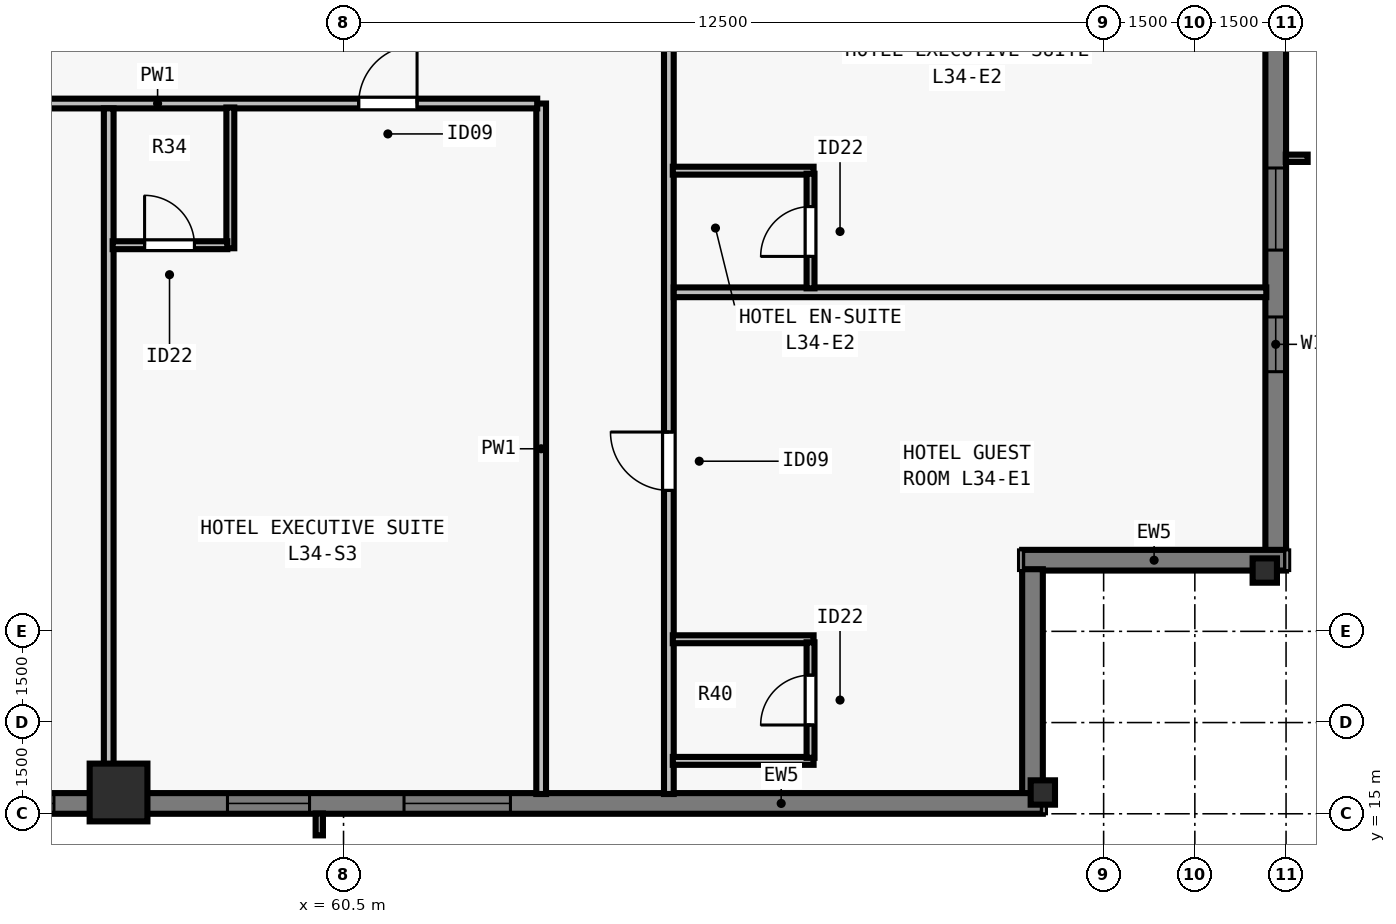
"""IFC4 building model, lengths in metres.
Left out: names, types, materials, properties, quantities, classifications, styles, units other than length and angle.
Written with IfcOpenShell. Run it as: python <this file> out.ifc"""

import sys

from ifc_helpers import new_model, si_unit, direction, frame, frame_2d, origin, origin_2d, place, context, subcontext, project, spatial, rectangle, i_section, extrude, element, fill, save


model = new_model("IFC4")
c1 = context("Model", 3, precision=1e-05, world=origin(), true_north=direction((0.0, 1.0)))
c2 = subcontext(c1, "Body", "Model", "MODEL_VIEW")
j1 = project(units=[si_unit("LENGTHUNIT", "METRE"), si_unit("PLANEANGLEUNIT", "RADIAN")], contexts=[c1])
p1 = place(None, origin())
s1 = spatial("IfcSite", under=j1, at=p1, CompositionType="ELEMENT")
p2 = place(p1, origin())
s2 = spatial("IfcBuilding", under=s1, at=p2, CompositionType="ELEMENT")
p3 = place(p2, frame((0.0, 0.0, 127.0)))
s3 = spatial("IfcBuildingStorey", under=s2, at=p3, CompositionType="ELEMENT", Elevation=127.0)
p4 = place(p3, frame((56.8, 15.35, 0.0), z_axis=(0.0, 0.0, 1.0), x_axis=(1.0, 0.0, 0.0)))
e1 = element("IfcColumn", 1, at=p4, inside=s3, PredefinedType="COLUMN", context=c2, shape_type="SweptSolid", body=[
    extrude(rectangle(XDim=0.95, YDim=0.95, at=origin_2d()), origin(), (0.0, 0.0, 1.0), 3.5),
])
for number, where, z_axis, x_axis in (
    (2, (72.0, 15.35, 0.0), (0.0, 0.0, 1.0), (1.0, 0.0, 0.0)),
    (3, (75.65, 19.0, 0.0), (0.0, 0.0, 1.0), (0.0, 1.0, 0.0)),
):
    element("IfcColumn", number, at=place(p3, frame(where, z_axis=z_axis, x_axis=x_axis)), inside=s3, PredefinedType="COLUMN", context=c2, shape_type="SweptSolid", body=[
        extrude(i_section(OverallWidth=0.4, OverallDepth=0.4, WebThickness=0.022, FlangeThickness=0.036, at=origin_2d()), origin(), (0.0, 0.0, 1.0), 3.5),
    ])
p5 = place(p3, frame((75.83, 59.0, 0.0), z_axis=(0.0, 0.0, 1.0), x_axis=(0.0, -1.0, 0.0)))
e4 = element("IfcWall", 4, at=p5, inside=s3, PredefinedType="SOLIDWALL", context=c2, shape_type="SweptSolid", body=[
    extrude(rectangle(XDim=39.682, YDim=0.34, at=frame_2d((19.841, 0.0))), origin(), (0.0, 0.0, 1.0), 3.28),
])
p6 = place(p5, frame((4.952, 0.0, 0.8)))
e5 = element("IfcOpeningElement", 5, at=p6, cuts=e4, PredefinedType="OPENING", context=c2, shape_type="SweptSolid", body=[
    extrude(rectangle(XDim=1.35, YDim=1.66, at=frame_2d((0.675, 0.83))), frame((0.0, 0.18, 0.0), z_axis=(0.0, -1.0, 0.0), x_axis=(1.0, 0.0, 0.0)), (0.0, 0.0, 1.0), 0.36),
])
p7 = place(p5, frame((8.305, 0.0, 0.8)))
e6 = element("IfcOpeningElement", 6, at=p7, cuts=e4, PredefinedType="OPENING", context=c2, shape_type="SweptSolid", body=[
    extrude(rectangle(XDim=1.75, YDim=1.66, at=frame_2d((0.875, 0.83))), frame((0.0, 0.18, 0.0), z_axis=(0.0, -1.0, 0.0), x_axis=(1.0, 0.0, 0.0)), (0.0, 0.0, 1.0), 0.36),
])
p8 = place(p5, frame((12.909, 0.0, 0.8)))
e7 = element("IfcOpeningElement", 7, at=p8, cuts=e4, PredefinedType="OPENING", context=c2, shape_type="SweptSolid", body=[
    extrude(rectangle(XDim=1.35, YDim=1.66, at=frame_2d((0.675, 0.83))), frame((0.0, 0.18, 0.0), z_axis=(0.0, -1.0, 0.0), x_axis=(1.0, 0.0, 0.0)), (0.0, 0.0, 1.0), 0.36),
])
p9 = place(p5, frame((16.262, 0.0, 0.8)))
e8 = element("IfcOpeningElement", 8, at=p9, cuts=e4, PredefinedType="OPENING", context=c2, shape_type="SweptSolid", body=[
    extrude(rectangle(XDim=1.75, YDim=1.66, at=frame_2d((0.875, 0.83))), frame((0.0, 0.18, 0.0), z_axis=(0.0, -1.0, 0.0), x_axis=(1.0, 0.0, 0.0)), (0.0, 0.0, 1.0), 0.36),
])
p10 = place(p5, frame((20.016, 0.0, 0.8)))
e9 = element("IfcOpeningElement", 9, at=p10, cuts=e4, PredefinedType="OPENING", context=c2, shape_type="SweptSolid", body=[
    extrude(rectangle(XDim=1.35, YDim=1.66, at=frame_2d((0.675, 0.83))), frame((0.0, 0.18, 0.0), z_axis=(0.0, -1.0, 0.0), x_axis=(1.0, 0.0, 0.0)), (0.0, 0.0, 1.0), 0.36),
])
p11 = place(p5, frame((22.07, 0.0, 0.8)))
e10 = element("IfcOpeningElement", 10, at=p11, cuts=e4, PredefinedType="OPENING", context=c2, shape_type="SweptSolid", body=[
    extrude(rectangle(XDim=1.75, YDim=1.66, at=frame_2d((0.875, 0.83))), frame((0.0, 0.18, 0.0), z_axis=(0.0, -1.0, 0.0), x_axis=(1.0, 0.0, 0.0)), (0.0, 0.0, 1.0), 0.36),
])
p12 = place(p5, frame((26.273, 0.0, 0.8)))
e11 = element("IfcOpeningElement", 11, at=p12, cuts=e4, PredefinedType="OPENING", context=c2, shape_type="SweptSolid", body=[
    extrude(rectangle(XDim=1.35, YDim=1.66, at=frame_2d((0.675, 0.83))), frame((0.0, 0.18, 0.0), z_axis=(0.0, -1.0, 0.0), x_axis=(1.0, 0.0, 0.0)), (0.0, 0.0, 1.0), 0.36),
])
p13 = place(p5, frame((29.627, 0.0, 0.8)))
e12 = element("IfcOpeningElement", 12, at=p13, cuts=e4, PredefinedType="OPENING", context=c2, shape_type="SweptSolid", body=[
    extrude(rectangle(XDim=1.75, YDim=1.66, at=frame_2d((0.875, 0.83))), frame((0.0, 0.18, 0.0), z_axis=(0.0, -1.0, 0.0), x_axis=(1.0, 0.0, 0.0)), (0.0, 0.0, 1.0), 0.36),
])
p14 = place(p5, frame((33.38, 0.0, 0.8)))
e13 = element("IfcOpeningElement", 13, at=p14, cuts=e4, PredefinedType="OPENING", context=c2, shape_type="SweptSolid", body=[
    extrude(rectangle(XDim=1.35, YDim=1.66, at=frame_2d((0.675, 0.83))), frame((0.0, 0.18, 0.0), z_axis=(0.0, -1.0, 0.0), x_axis=(1.0, 0.0, 0.0)), (0.0, 0.0, 1.0), 0.36),
])
p15 = place(p5, frame((35.83, 0.0, 0.8)))
e14 = element("IfcOpeningElement", 14, at=p15, cuts=e4, PredefinedType="OPENING", context=c2, shape_type="SweptSolid", body=[
    extrude(rectangle(XDim=0.9, YDim=1.66, at=frame_2d((0.45, 0.83))), frame((0.0, 0.18, 0.0), z_axis=(0.0, -1.0, 0.0), x_axis=(1.0, 0.0, 0.0)), (0.0, 0.0, 1.0), 0.36),
])
p16 = place(p3, frame((76.0, 19.17, 0.0), z_axis=(0.0, 0.0, 1.0), x_axis=(-1.0, 0.0, 0.0)))
e15 = element("IfcWall", 15, at=p16, inside=s3, PredefinedType="SOLIDWALL", context=c2, shape_type="SweptSolid", body=[
    extrude(rectangle(XDim=4.34, YDim=0.34, at=frame_2d((2.17, 0.0))), origin(), (0.0, 0.0, 1.0), 3.28),
])
p17 = place(p3, frame((71.83, 19.022, 0.0), z_axis=(0.0, 0.0, 1.0), x_axis=(0.0, -1.0, 0.0)))
e16 = element("IfcWall", 16, at=p17, inside=s3, PredefinedType="SOLIDWALL", context=c2, shape_type="SweptSolid", body=[
    extrude(rectangle(XDim=3.704, YDim=0.34, at=frame_2d((1.852, 0.0))), origin(), (0.0, 0.0, 1.0), 3.28),
])
p18 = place(p3, frame((72.0, 15.17, 0.0), z_axis=(0.0, 0.0, 1.0), x_axis=(-1.0, 0.0, 0.0)))
e17 = element("IfcWall", 17, at=p18, inside=s3, PredefinedType="SOLIDWALL", context=c2, shape_type="SweptSolid", body=[
    extrude(rectangle(XDim=39.682, YDim=0.34, at=frame_2d((19.841, 0.0))), origin(), (0.0, 0.0, 1.0), 3.28),
])
p19 = place(p18, frame((8.755, 0.0, 0.8)))
e18 = element("IfcOpeningElement", 18, at=p19, cuts=e17, PredefinedType="OPENING", context=c2, shape_type="SweptSolid", body=[
    extrude(rectangle(XDim=1.75, YDim=1.66, at=frame_2d((0.875, 0.83))), frame((0.0, 0.18, 0.0), z_axis=(0.0, -1.0, 0.0), x_axis=(1.0, 0.0, 0.0)), (0.0, 0.0, 1.0), 0.36),
])
p20 = place(p18, frame((12.059, 0.0, 0.8)))
e19 = element("IfcOpeningElement", 19, at=p20, cuts=e17, PredefinedType="OPENING", context=c2, shape_type="SweptSolid", body=[
    extrude(rectangle(XDim=1.35, YDim=1.66, at=frame_2d((0.675, 0.83))), frame((0.0, 0.18, 0.0), z_axis=(0.0, -1.0, 0.0), x_axis=(1.0, 0.0, 0.0)), (0.0, 0.0, 1.0), 0.36),
])
p21 = place(p18, frame((16.262, 0.0, 0.8)))
e20 = element("IfcOpeningElement", 20, at=p21, cuts=e17, PredefinedType="OPENING", context=c2, shape_type="SweptSolid", body=[
    extrude(rectangle(XDim=1.75, YDim=1.66, at=frame_2d((0.875, 0.83))), frame((0.0, 0.18, 0.0), z_axis=(0.0, -1.0, 0.0), x_axis=(1.0, 0.0, 0.0)), (0.0, 0.0, 1.0), 0.36),
])
p22 = place(p18, frame((19.166, 0.0, 0.8)))
e21 = element("IfcOpeningElement", 21, at=p22, cuts=e17, PredefinedType="OPENING", context=c2, shape_type="SweptSolid", body=[
    extrude(rectangle(XDim=1.35, YDim=1.66, at=frame_2d((0.675, 0.83))), frame((0.0, 0.18, 0.0), z_axis=(0.0, -1.0, 0.0), x_axis=(1.0, 0.0, 0.0)), (0.0, 0.0, 1.0), 0.36),
])
p23 = place(p18, frame((21.27, 0.0, 0.8)))
e22 = element("IfcOpeningElement", 22, at=p23, cuts=e17, PredefinedType="OPENING", context=c2, shape_type="SweptSolid", body=[
    extrude(rectangle(XDim=1.75, YDim=1.66, at=frame_2d((0.875, 0.83))), frame((0.0, 0.18, 0.0), z_axis=(0.0, -1.0, 0.0), x_axis=(1.0, 0.0, 0.0)), (0.0, 0.0, 1.0), 0.36),
])
p24 = place(p18, frame((26.273, 0.0, 0.8)))
e23 = element("IfcOpeningElement", 23, at=p24, cuts=e17, PredefinedType="OPENING", context=c2, shape_type="SweptSolid", body=[
    extrude(rectangle(XDim=1.35, YDim=1.66, at=frame_2d((0.675, 0.83))), frame((0.0, 0.18, 0.0), z_axis=(0.0, -1.0, 0.0), x_axis=(1.0, 0.0, 0.0)), (0.0, 0.0, 1.0), 0.36),
])
p25 = place(p18, frame((28.377, 0.0, 0.8)))
e24 = element("IfcOpeningElement", 24, at=p25, cuts=e17, PredefinedType="OPENING", context=c2, shape_type="SweptSolid", body=[
    extrude(rectangle(XDim=1.75, YDim=1.66, at=frame_2d((0.875, 0.83))), frame((0.0, 0.18, 0.0), z_axis=(0.0, -1.0, 0.0), x_axis=(1.0, 0.0, 0.0)), (0.0, 0.0, 1.0), 0.36),
])
p26 = place(p18, frame((32.93, 0.0, 0.8)))
e25 = element("IfcOpeningElement", 25, at=p26, cuts=e17, PredefinedType="OPENING", context=c2, shape_type="SweptSolid", body=[
    extrude(rectangle(XDim=1.35, YDim=1.66, at=frame_2d((0.675, 0.83))), frame((0.0, 0.18, 0.0), z_axis=(0.0, -1.0, 0.0), x_axis=(1.0, 0.0, 0.0)), (0.0, 0.0, 1.0), 0.36),
])
p27 = place(p3, frame((65.85, 15.325, 0.0), z_axis=(0.0, 0.0, 1.0), x_axis=(0.0, 1.0, 0.0)))
e26 = element("IfcWall", 26, at=p27, inside=s3, PredefinedType="PARTITIONING", context=c2, shape_type="SweptSolid", body=[
    extrude(rectangle(XDim=47.35, YDim=0.16, at=frame_2d((23.675, 0.0))), origin(), (0.0, 0.0, 1.0), 2.555),
])
p28 = place(p27, frame((4.993, 0.0, 0.0)))
e27 = element("IfcOpeningElement", 27, at=p28, cuts=e26, PredefinedType="OPENING", context=c2, shape_type="SweptSolid", body=[
    extrude(rectangle(XDim=0.96, YDim=2.15, at=frame_2d((0.48, 1.075))), frame((0.0, 0.09, 0.0), z_axis=(0.0, -1.0, 0.0), x_axis=(1.0, 0.0, 0.0)), (0.0, 0.0, 1.0), 0.18),
])
p29 = place(p27, frame((12.525, 0.0, 0.0)))
e28 = element("IfcOpeningElement", 28, at=p29, cuts=e26, PredefinedType="OPENING", context=c2, shape_type="SweptSolid", body=[
    extrude(rectangle(XDim=0.96, YDim=2.15, at=frame_2d((0.48, 1.075))), frame((0.0, 0.09, 0.0), z_axis=(0.0, -1.0, 0.0), x_axis=(1.0, 0.0, 0.0)), (0.0, 0.0, 1.0), 0.18),
])
p30 = place(p27, frame((20.385, 0.0, 0.0)))
e29 = element("IfcOpeningElement", 29, at=p30, cuts=e26, PredefinedType="OPENING", context=c2, shape_type="SweptSolid", body=[
    extrude(rectangle(XDim=0.96, YDim=2.15, at=frame_2d((0.48, 1.075))), frame((0.0, 0.09, 0.0), z_axis=(0.0, -1.0, 0.0), x_axis=(1.0, 0.0, 0.0)), (0.0, 0.0, 1.0), 0.18),
])
p31 = place(p27, frame((28.246, 0.0, 0.0)))
e30 = element("IfcOpeningElement", 30, at=p31, cuts=e26, PredefinedType="OPENING", context=c2, shape_type="SweptSolid", body=[
    extrude(rectangle(XDim=0.96, YDim=2.15, at=frame_2d((0.48, 1.075))), frame((0.0, 0.09, 0.0), z_axis=(0.0, -1.0, 0.0), x_axis=(1.0, 0.0, 0.0)), (0.0, 0.0, 1.0), 0.18),
])
p32 = place(p27, frame((36.105, 0.0, 0.0)))
e31 = element("IfcOpeningElement", 31, at=p32, cuts=e26, PredefinedType="OPENING", context=c2, shape_type="SweptSolid", body=[
    extrude(rectangle(XDim=0.96, YDim=2.15, at=frame_2d((0.48, 1.075))), frame((0.0, 0.09, 0.0), z_axis=(0.0, -1.0, 0.0), x_axis=(1.0, 0.0, 0.0)), (0.0, 0.0, 1.0), 0.18),
])
p33 = place(p27, frame((44.068, 0.0, 0.0)))
e32 = element("IfcOpeningElement", 32, at=p33, cuts=e26, PredefinedType="OPENING", context=c2, shape_type="SweptSolid", body=[
    extrude(rectangle(XDim=0.96, YDim=2.15, at=frame_2d((0.48, 1.075))), frame((0.0, 0.09, 0.0), z_axis=(0.0, -1.0, 0.0), x_axis=(1.0, 0.0, 0.0)), (0.0, 0.0, 1.0), 0.18),
])
p34 = place(p3, frame((63.75, 15.325, 0.0), z_axis=(0.0, 0.0, 1.0), x_axis=(0.0, 1.0, 0.0)))
e33 = element("IfcWall", 33, at=p34, inside=s3, PredefinedType="PARTITIONING", context=c2, shape_type="SweptSolid", body=[
    extrude(rectangle(XDim=11.355, YDim=0.16, at=frame_2d((5.677, 0.0))), origin(), (0.0, 0.0, 1.0), 2.555),
])
p35 = place(p3, frame((41.615, 26.68, 0.0), z_axis=(0.0, 0.0, 1.0), x_axis=(1.0, 0.0, 0.0)))
e34 = element("IfcWall", 34, at=p35, inside=s3, PredefinedType="PARTITIONING", context=c2, shape_type="SweptSolid", body=[
    extrude(rectangle(XDim=22.07, YDim=0.16, at=frame_2d((11.035, 0.0))), origin(), (0.0, 0.0, 1.0), 3.28),
])
p36 = place(p35, frame((4.281, 0.0, 0.0)))
e35 = element("IfcOpeningElement", 35, at=p36, cuts=e34, PredefinedType="OPENING", context=c2, shape_type="SweptSolid", body=[
    extrude(rectangle(XDim=0.96, YDim=2.15, at=frame_2d((0.48, 1.075))), frame((0.0, 0.09, 0.0), z_axis=(0.0, -1.0, 0.0), x_axis=(1.0, 0.0, 0.0)), (0.0, 0.0, 1.0), 0.18),
])
p37 = place(p35, frame((11.56, 0.0, 0.0)))
e36 = element("IfcOpeningElement", 36, at=p37, cuts=e34, PredefinedType="OPENING", context=c2, shape_type="SweptSolid", body=[
    extrude(rectangle(XDim=0.96, YDim=2.15, at=frame_2d((0.48, 1.075))), frame((0.0, 0.09, 0.0), z_axis=(0.0, -1.0, 0.0), x_axis=(1.0, 0.0, 0.0)), (0.0, 0.0, 1.0), 0.18),
])
p38 = place(p35, frame((19.134, 0.0, 0.0)))
e37 = element("IfcOpeningElement", 37, at=p38, cuts=e34, PredefinedType="OPENING", context=c2, shape_type="SweptSolid", body=[
    extrude(rectangle(XDim=0.96, YDim=2.15, at=frame_2d((0.48, 1.075))), frame((0.0, 0.09, 0.0), z_axis=(0.0, -1.0, 0.0), x_axis=(1.0, 0.0, 0.0)), (0.0, 0.0, 1.0), 0.18),
])
p39 = place(p3, frame((56.638, 15.325, 0.0), z_axis=(0.0, 0.0, 1.0), x_axis=(0.0, 1.0, 0.0)))
e38 = element("IfcWall", 38, at=p39, inside=s3, PredefinedType="PARTITIONING", context=c2, shape_type="SweptSolid", body=[
    extrude(rectangle(XDim=11.275, YDim=0.16, at=frame_2d((5.638, 0.0))), origin(), (0.0, 0.0, 1.0), 2.555),
])
p40 = place(p3, frame((58.638, 24.3, 0.0), z_axis=(0.0, 0.0, 1.0), x_axis=(0.0, 1.0, 0.0)))
e39 = element("IfcWall", 39, at=p40, inside=s3, PredefinedType="PLUMBINGWALL", context=c2, shape_type="SweptSolid", body=[
    extrude(rectangle(XDim=2.315, YDim=0.13, at=frame_2d((1.157, 0.0))), origin(), (0.0, 0.0, 1.0), 3.28),
])
p41 = place(p3, frame((56.703, 24.35, 0.0), z_axis=(0.0, 0.0, 1.0), x_axis=(1.0, 0.0, 0.0)))
e40 = element("IfcWall", 40, at=p41, inside=s3, PredefinedType="PLUMBINGWALL", context=c2, shape_type="SweptSolid", body=[
    extrude(rectangle(XDim=1.885, YDim=0.13, at=frame_2d((0.942, 0.0))), origin(), (0.0, 0.0, 1.0), 3.28),
])
p42 = place(p41, frame((0.525, 0.0, 0.0)))
e41 = element("IfcOpeningElement", 41, at=p42, cuts=e40, PredefinedType="OPENING", context=c2, shape_type="SweptSolid", body=[
    extrude(rectangle(XDim=0.82, YDim=2.1, at=frame_2d((0.41, 1.05))), frame((0.0, 0.075, 0.0), z_axis=(0.0, -1.0, 0.0), x_axis=(1.0, 0.0, 0.0)), (0.0, 0.0, 1.0), 0.15),
])
for number, where, z_axis, x_axis in (
    (42, (65.915, 15.87, 0.0), (0.0, 0.0, 1.0), (1.0, 0.0, 0.0)),
    (43, (65.915, 17.87, 0.0), (0.0, 0.0, 1.0), (1.0, 0.0, 0.0)),
):
    element("IfcWall", number, at=place(p3, frame(where, z_axis=z_axis, x_axis=x_axis)), inside=s3, PredefinedType="PLUMBINGWALL", context=c2, shape_type="SweptSolid", body=[
        extrude(rectangle(XDim=2.315, YDim=0.13, at=frame_2d((1.157, 0.0))), origin(), (0.0, 0.0, 1.0), 3.28),
    ])
p43 = place(p3, frame((68.18, 15.92, 0.0), z_axis=(0.0, 0.0, 1.0), x_axis=(0.0, 1.0, 0.0)))
e44 = element("IfcWall", 44, at=p43, inside=s3, PredefinedType="PLUMBINGWALL", context=c2, shape_type="SweptSolid", body=[
    extrude(rectangle(XDim=1.9, YDim=0.13, at=frame_2d((0.95, 0.0))), origin(), (0.0, 0.0, 1.0), 3.28),
])
p44 = place(p43, frame((0.54, 0.0, 0.0)))
e45 = element("IfcOpeningElement", 45, at=p44, cuts=e44, PredefinedType="OPENING", context=c2, shape_type="SweptSolid", body=[
    extrude(rectangle(XDim=0.82, YDim=2.1, at=frame_2d((0.41, 1.05))), frame((0.0, 0.075, 0.0), z_axis=(0.0, -1.0, 0.0), x_axis=(1.0, 0.0, 0.0)), (0.0, 0.0, 1.0), 0.15),
])
p45 = place(p3, frame((65.93, 23.576, 0.0), z_axis=(0.0, 0.0, 1.0), x_axis=(1.0, 0.0, 0.0)))
e46 = element("IfcWall", 46, at=p45, inside=s3, PredefinedType="PARTITIONING", context=c2, shape_type="SweptSolid", body=[
    extrude(rectangle(XDim=9.745, YDim=0.16, at=frame_2d((4.873, 0.0))), origin(), (0.0, 0.0, 1.0), 2.896),
])
p46 = place(p3, frame((65.915, 25.576, 0.0), z_axis=(0.0, 0.0, 1.0), x_axis=(1.0, 0.0, 0.0)))
e47 = element("IfcWall", 47, at=p46, inside=s3, PredefinedType="PLUMBINGWALL", context=c2, shape_type="SweptSolid", body=[
    extrude(rectangle(XDim=2.315, YDim=0.13, at=frame_2d((1.157, 0.0))), origin(), (0.0, 0.0, 1.0), 2.896),
])
p47 = place(p3, frame((68.18, 23.641, 0.0), z_axis=(0.0, 0.0, 1.0), x_axis=(0.0, 1.0, 0.0)))
e48 = element("IfcWall", 48, at=p47, inside=s3, PredefinedType="PLUMBINGWALL", context=c2, shape_type="SweptSolid", body=[
    extrude(rectangle(XDim=1.885, YDim=0.13, at=frame_2d((0.942, 0.0))), origin(), (0.0, 0.0, 1.0), 3.28),
])
p48 = place(p47, frame((0.525, 0.0, 0.0)))
e49 = element("IfcOpeningElement", 49, at=p48, cuts=e48, PredefinedType="OPENING", context=c2, shape_type="SweptSolid", body=[
    extrude(rectangle(XDim=0.82, YDim=2.1, at=frame_2d((0.41, 1.05))), frame((0.0, 0.075, 0.0), z_axis=(0.0, -1.0, 0.0), x_axis=(1.0, 0.0, 0.0)), (0.0, 0.0, 1.0), 0.15),
])
p49 = place(p14, origin())
e50 = element("IfcWindow", 50, at=p49, inside=s3, PartitioningType="SINGLE_PANEL", PredefinedType="WINDOW", context=c2, shape_type="SweptSolid", body=[
    extrude(rectangle(XDim=1.35, YDim=1.66, at=frame_2d((0.675, 0.83))), frame((0.0, -0.05, 0.0), z_axis=(0.0, -1.0, 0.0), x_axis=(1.0, 0.0, 0.0)), (0.0, 0.0, 1.0), 0.06),
])
fill(e13, e50)
p50 = place(p19, origin())
e51 = element("IfcWindow", 51, at=p50, inside=s3, PartitioningType="SINGLE_PANEL", PredefinedType="WINDOW", context=c2, shape_type="SweptSolid", body=[
    extrude(rectangle(XDim=1.75, YDim=1.66, at=frame_2d((0.875, 0.83))), frame((0.0, -0.05, 0.0), z_axis=(0.0, -1.0, 0.0), x_axis=(1.0, 0.0, 0.0)), (0.0, 0.0, 1.0), 0.06),
])
fill(e18, e51)
p51 = place(p20, origin())
e52 = element("IfcWindow", 52, at=p51, inside=s3, PartitioningType="SINGLE_PANEL", PredefinedType="WINDOW", context=c2, shape_type="SweptSolid", body=[
    extrude(rectangle(XDim=1.35, YDim=1.66, at=frame_2d((0.675, 0.83))), frame((0.0, -0.05, 0.0), z_axis=(0.0, -1.0, 0.0), x_axis=(1.0, 0.0, 0.0)), (0.0, 0.0, 1.0), 0.06),
])
fill(e19, e52)
p52 = place(p21, origin())
e53 = element("IfcWindow", 53, at=p52, inside=s3, PartitioningType="SINGLE_PANEL", PredefinedType="WINDOW", context=c2, shape_type="SweptSolid", body=[
    extrude(rectangle(XDim=1.75, YDim=1.66, at=frame_2d((0.875, 0.83))), frame((0.0, -0.05, 0.0), z_axis=(0.0, -1.0, 0.0), x_axis=(1.0, 0.0, 0.0)), (0.0, 0.0, 1.0), 0.06),
])
fill(e20, e53)
p53 = place(p15, origin())
e54 = element("IfcWindow", 54, at=p53, inside=s3, PartitioningType="SINGLE_PANEL", PredefinedType="WINDOW", context=c2, shape_type="SweptSolid", body=[
    extrude(rectangle(XDim=0.9, YDim=1.66, at=frame_2d((0.45, 0.83))), frame((0.0, -0.04, 0.0), z_axis=(0.0, -1.0, 0.0), x_axis=(1.0, 0.0, 0.0)), (0.0, 0.0, 1.0), 0.06),
])
fill(e14, e54)
p54 = place(p42, origin())
e55 = element("IfcDoor", 55, at=p54, inside=s3, OperationType="SINGLE_SWING_LEFT", PredefinedType="DOOR", context=c2, shape_type="SweptSolid", body=[
    extrude(rectangle(XDim=0.82, YDim=2.1, at=frame_2d((0.41, 1.05))), frame((0.0, 0.025, 0.0), z_axis=(0.0, -1.0, 0.0), x_axis=(1.0, 0.0, 0.0)), (0.0, 0.0, 1.0), 0.05),
])
fill(e41, e55)
p55 = place(p38, origin())
e56 = element("IfcDoor", 56, at=p55, inside=s3, OperationType="SINGLE_SWING_RIGHT", PredefinedType="DOOR", context=c2, shape_type="SweptSolid", body=[
    extrude(rectangle(XDim=0.96, YDim=2.15, at=frame_2d((0.48, 1.075))), frame((0.0, 0.025, 0.0), z_axis=(0.0, -1.0, 0.0), x_axis=(1.0, 0.0, 0.0)), (0.0, 0.0, 1.0), 0.05),
])
fill(e37, e56)
p56 = place(p44, origin())
e57 = element("IfcDoor", 57, at=p56, inside=s3, OperationType="SINGLE_SWING_LEFT", PredefinedType="DOOR", context=c2, shape_type="SweptSolid", body=[
    extrude(rectangle(XDim=0.82, YDim=2.1, at=frame_2d((0.41, 1.05))), frame((0.0, 0.025, 0.0), z_axis=(0.0, -1.0, 0.0), x_axis=(1.0, 0.0, 0.0)), (0.0, 0.0, 1.0), 0.05),
])
fill(e45, e57)
p57 = place(p28, origin())
e58 = element("IfcDoor", 58, at=p57, inside=s3, OperationType="SINGLE_SWING_RIGHT", PredefinedType="DOOR", context=c2, shape_type="SweptSolid", body=[
    extrude(rectangle(XDim=0.96, YDim=2.15, at=frame_2d((0.48, 1.075))), frame((0.0, 0.025, 0.0), z_axis=(0.0, -1.0, 0.0), x_axis=(1.0, 0.0, 0.0)), (0.0, 0.0, 1.0), 0.05),
])
fill(e27, e58)
p58 = place(p48, origin())
e59 = element("IfcDoor", 59, at=p58, inside=s3, OperationType="SINGLE_SWING_LEFT", PredefinedType="DOOR", context=c2, shape_type="SweptSolid", body=[
    extrude(rectangle(XDim=0.82, YDim=2.1, at=frame_2d((0.41, 1.05))), frame((0.0, 0.025, 0.0), z_axis=(0.0, -1.0, 0.0), x_axis=(1.0, 0.0, 0.0)), (0.0, 0.0, 1.0), 0.05),
])
fill(e49, e59)
save(model, sys.argv[1])
